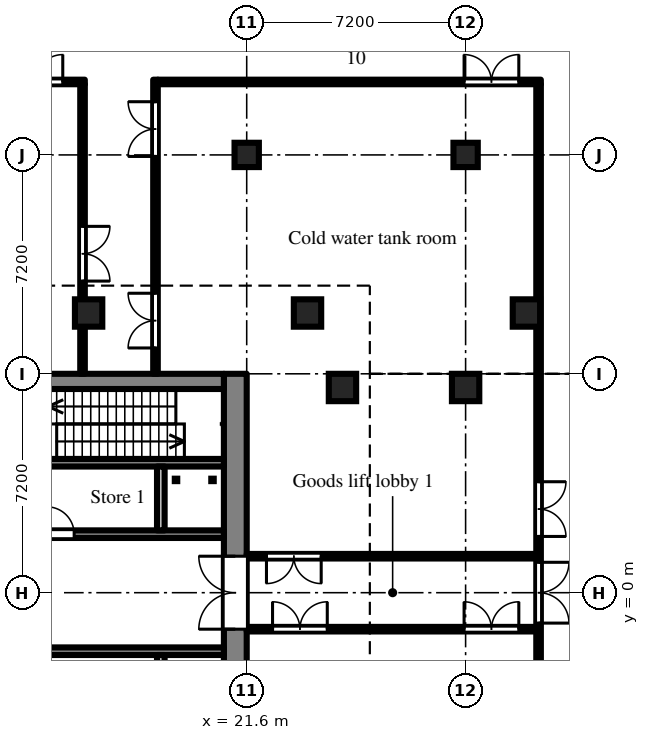
"""IFC4 building model, lengths in metres.
Left out: names, types, materials, properties, quantities, classifications, styles, units other than length and angle.
Written with IfcOpenShell. Run it as: python <this file> out.ifc"""

import sys

from ifc_helpers import new_model, si_unit, direction, frame, frame_2d, origin, origin_2d, place, context, subcontext, project, spatial, rectangle, extrude, element, fill, save


model = new_model("IFC4")
c1 = context("Model", 3, precision=1e-05, world=origin(), true_north=direction((0.0, 1.0)))
c2 = subcontext(c1, "Body", "Model", "MODEL_VIEW")
j1 = project(units=[si_unit("LENGTHUNIT", "METRE"), si_unit("PLANEANGLEUNIT", "RADIAN")], contexts=[c1])
p1 = place(None, origin())
s1 = spatial("IfcSite", under=j1, at=p1, CompositionType="ELEMENT")
p2 = place(p1, origin())
s2 = spatial("IfcBuilding", under=s1, at=p2, CompositionType="ELEMENT")
p3 = place(p2, frame((0.0, 0.0, -4.8)))
s3 = spatial("IfcBuildingStorey", under=s2, at=p3, CompositionType="ELEMENT", Elevation=-4.8)
for number, where, z_axis, x_axis in (
    (1, (24.75, 6.75, -0.5), (0.0, 0.0, 1.0), (1.0, 0.0, 0.0)),
    (2, (28.8, 6.75, -0.5), (0.0, 0.0, 1.0), (1.0, 0.0, 0.0)),
):
    element("IfcColumn", number, at=place(p3, frame(where, z_axis=z_axis, x_axis=x_axis)), inside=s3, PredefinedType="COLUMN", context=c2, shape_type="SweptSolid", body=[
        extrude(rectangle(XDim=0.9, YDim=0.9, at=origin_2d()), origin(), (0.0, 0.0, 1.0), 5.3),
    ])
for number, where, z_axis, x_axis in (
    (3, (21.6, 14.4, -0.5), (0.0, 0.0, 1.0), (1.0, 0.0, 0.0)),
    (4, (28.8, 14.4, -0.5), (0.0, 0.0, 1.0), (1.0, 0.0, 0.0)),
):
    element("IfcColumn", number, at=place(p3, frame(where, z_axis=z_axis, x_axis=x_axis)), inside=s3, PredefinedType="COLUMN", context=c2, shape_type="SweptSolid", body=[
        extrude(rectangle(XDim=0.8, YDim=0.8, at=origin_2d()), origin(), (0.0, 0.0, 1.0), 5.3),
    ])
for number, where, z_axis, x_axis in (
    (5, (16.4, 9.2, -0.5), (0.0, 0.0, 1.0), (1.0, 0.0, 0.0)),
    (6, (23.6, 9.2, -0.5), (0.0, 0.0, 1.0), (1.0, 0.0, 0.0)),
    (7, (30.8, 9.2, -0.5), (0.0, 0.0, 1.0), (1.0, 0.0, 0.0)),
):
    element("IfcColumn", number, at=place(p3, frame(where, z_axis=z_axis, x_axis=x_axis)), inside=s3, PredefinedType="COLUMN", context=c2, shape_type="SweptSolid", body=[
        extrude(rectangle(XDim=0.9, YDim=0.9, at=origin_2d()), origin(), (0.0, 0.0, 1.0), 5.3),
    ])
p4 = place(p3, frame((21.225, -7.2, 0.0), z_axis=(0.0, 0.0, 1.0), x_axis=(0.0, 1.0, 0.0)))
e8 = element("IfcWall", 8, at=p4, inside=s3, PredefinedType="SHEAR", context=c2, shape_type="SweptSolid", body=[
    extrude(rectangle(XDim=14.4, YDim=0.75, at=frame_2d((7.2, 0.0))), origin(), (0.0, 0.0, 1.0), 4.35),
])
p5 = place(p4, frame((6.0, 0.0, 0.0)))
e9 = element("IfcOpeningElement", 9, at=p5, cuts=e8, PredefinedType="OPENING", context=c2, shape_type="SweptSolid", body=[
    extrude(rectangle(XDim=2.4, YDim=2.2, at=frame_2d((1.2, 1.1))), frame((0.0, 0.385, 0.0), z_axis=(0.0, -1.0, 0.0), x_axis=(1.0, 0.0, 0.0)), (0.0, 0.0, 1.0), 0.77),
])
p6 = place(p3, frame((7.9, 6.95, 0.0), z_axis=(0.0, 0.0, 1.0), x_axis=(1.0, 0.0, 0.0)))
e10 = element("IfcWall", 10, at=p6, inside=s3, PredefinedType="SHEAR", context=c2, shape_type="SweptSolid", body=[
    extrude(rectangle(XDim=12.95, YDim=0.5, at=frame_2d((6.475, 0.0))), origin(), (0.0, 0.0, 1.0), 4.35),
])
p7 = place(p3, frame((7.9, 1.925, 0.0), z_axis=(0.0, 0.0, 1.0), x_axis=(1.0, 0.0, 0.0)))
e11 = element("IfcWall", 11, at=p7, inside=s3, PredefinedType="SHEAR", context=c2, shape_type="SweptSolid", body=[
    extrude(rectangle(XDim=12.95, YDim=0.25, at=frame_2d((6.475, 0.0))), origin(), (0.0, 0.0, 1.0), 4.35),
])
p8 = place(p7, frame((0.525, 0.0, 0.0)))
e12 = element("IfcOpeningElement", 12, at=p8, cuts=e11, PredefinedType="OPENING", context=c2, shape_type="SweptSolid", body=[
    extrude(rectangle(XDim=0.9, YDim=2.1, at=frame_2d((0.45, 1.05))), frame((0.0, 0.135, 0.0), z_axis=(0.0, -1.0, 0.0), x_axis=(1.0, 0.0, 0.0)), (0.0, 0.0, 1.0), 0.27),
])
p9 = place(p7, frame((2.625, 0.0, 0.0)))
e13 = element("IfcOpeningElement", 13, at=p9, cuts=e11, PredefinedType="OPENING", context=c2, shape_type="SweptSolid", body=[
    extrude(rectangle(XDim=1.1, YDim=2.1, at=frame_2d((0.55, 1.05))), frame((0.0, 0.135, 0.0), z_axis=(0.0, -1.0, 0.0), x_axis=(1.0, 0.0, 0.0)), (0.0, 0.0, 1.0), 0.27),
])
p10 = place(p7, frame((7.125, 0.0, 0.0)))
e14 = element("IfcOpeningElement", 14, at=p10, cuts=e11, PredefinedType="OPENING", context=c2, shape_type="SweptSolid", body=[
    extrude(rectangle(XDim=0.9, YDim=2.1, at=frame_2d((0.45, 1.05))), frame((0.0, 0.135, 0.0), z_axis=(0.0, -1.0, 0.0), x_axis=(1.0, 0.0, 0.0)), (0.0, 0.0, 1.0), 0.27),
])
p11 = place(p3, frame((12.3, 4.275, 0.0), z_axis=(0.0, 0.0, 1.0), x_axis=(1.0, 0.0, 0.0)))
e15 = element("IfcWall", 15, at=p11, inside=s3, PredefinedType="SHEAR", context=c2, shape_type="SweptSolid", body=[
    extrude(rectangle(XDim=8.55, YDim=0.25, at=frame_2d((4.275, 0.0))), origin(), (0.0, 0.0, 1.0), 4.35),
])
p12 = place(p3, frame((18.775, 2.05, 0.0), z_axis=(0.0, 0.0, 1.0), x_axis=(0.0, 1.0, 0.0)))
e16 = element("IfcWall", 16, at=p12, inside=s3, PredefinedType="PARTITIONING", context=c2, shape_type="SweptSolid", body=[
    extrude(rectangle(XDim=2.1, YDim=0.25, at=frame_2d((1.05, 0.0))), origin(), (0.0, 0.0, 1.0), 4.35),
])
p13 = place(p3, frame((7.9, -1.925, 0.0), z_axis=(0.0, 0.0, 1.0), x_axis=(1.0, 0.0, 0.0)))
e17 = element("IfcWall", 17, at=p13, inside=s3, PredefinedType="SHEAR", context=c2, shape_type="SweptSolid", body=[
    extrude(rectangle(XDim=12.95, YDim=0.25, at=frame_2d((6.475, 0.0))), origin(), (0.0, 0.0, 1.0), 4.35),
])
p14 = place(p13, frame((0.525, 0.0, 0.0)))
e18 = element("IfcOpeningElement", 18, at=p14, cuts=e17, PredefinedType="OPENING", context=c2, shape_type="SweptSolid", body=[
    extrude(rectangle(XDim=0.9, YDim=2.1, at=frame_2d((0.45, 1.05))), frame((0.0, 0.135, 0.0), z_axis=(0.0, -1.0, 0.0), x_axis=(1.0, 0.0, 0.0)), (0.0, 0.0, 1.0), 0.27),
])
p15 = place(p13, frame((2.625, 0.0, 0.0)))
e19 = element("IfcOpeningElement", 19, at=p15, cuts=e17, PredefinedType="OPENING", context=c2, shape_type="SweptSolid", body=[
    extrude(rectangle(XDim=1.1, YDim=2.1, at=frame_2d((0.55, 1.05))), frame((0.0, 0.135, 0.0), z_axis=(0.0, -1.0, 0.0), x_axis=(1.0, 0.0, 0.0)), (0.0, 0.0, 1.0), 0.27),
])
p16 = place(p3, frame((18.775, -2.05, 0.0), z_axis=(0.0, 0.0, 1.0), x_axis=(0.0, -1.0, 0.0)))
e20 = element("IfcWall", 20, at=p16, inside=s3, PredefinedType="PARTITIONING", context=c2, shape_type="SweptSolid", body=[
    extrude(rectangle(XDim=2.1, YDim=0.25, at=frame_2d((1.05, 0.0))), origin(), (0.0, 0.0, 1.0), 4.35),
])
p17 = place(p3, frame((1.275, 16.8, 0.0), z_axis=(0.0, 0.0, 1.0), x_axis=(1.0, 0.0, 0.0)))
e21 = element("IfcWall", 21, at=p17, inside=s3, PredefinedType="PARTITIONING", context=c2, shape_type="SweptSolid", body=[
    extrude(rectangle(XDim=15.0, YDim=0.15, at=frame_2d((7.5, 0.0))), origin(), (0.0, 0.0, 1.0), 4.35),
])
p18 = place(p17, frame((12.475, 0.0, 0.0)))
e22 = element("IfcOpeningElement", 22, at=p18, cuts=e21, PredefinedType="OPENING", context=c2, shape_type="SweptSolid", body=[
    extrude(rectangle(XDim=1.8, YDim=2.1, at=frame_2d((0.9, 1.05))), frame((0.0, 0.085, 0.0), z_axis=(0.0, -1.0, 0.0), x_axis=(1.0, 0.0, 0.0)), (0.0, 0.0, 1.0), 0.17),
])
p19 = place(p3, frame((16.2, 7.2, 0.0), z_axis=(0.0, 0.0, 1.0), x_axis=(0.0, 1.0, 0.0)))
e23 = element("IfcWall", 23, at=p19, inside=s3, PredefinedType="PARTITIONING", context=c2, shape_type="SweptSolid", body=[
    extrude(rectangle(XDim=9.525, YDim=0.15, at=frame_2d((4.763, 0.0))), origin(), (0.0, 0.0, 1.0), 4.35),
])
p20 = place(p19, frame((3.05, 0.0, 0.0)))
e24 = element("IfcOpeningElement", 24, at=p20, cuts=e23, PredefinedType="OPENING", context=c2, shape_type="SweptSolid", body=[
    extrude(rectangle(XDim=1.8, YDim=2.1, at=frame_2d((0.9, 1.05))), frame((0.0, 0.085, 0.0), z_axis=(0.0, -1.0, 0.0), x_axis=(1.0, 0.0, 0.0)), (0.0, 0.0, 1.0), 0.17),
])
p21 = place(p3, frame((18.6, 7.2, 0.0), z_axis=(0.0, 0.0, 1.0), x_axis=(0.0, 1.0, 0.0)))
e25 = element("IfcWall", 25, at=p21, inside=s3, PredefinedType="PARTITIONING", context=c2, shape_type="SweptSolid", body=[
    extrude(rectangle(XDim=9.675, YDim=0.15, at=frame_2d((4.837, 0.0))), origin(), (0.0, 0.0, 1.0), 4.35),
])
p22 = place(p21, frame((0.85, 0.0, 0.0)))
e26 = element("IfcOpeningElement", 26, at=p22, cuts=e25, PredefinedType="OPENING", context=c2, shape_type="SweptSolid", body=[
    extrude(rectangle(XDim=1.8, YDim=2.1, at=frame_2d((0.9, 1.05))), frame((0.0, 0.085, 0.0), z_axis=(0.0, -1.0, 0.0), x_axis=(1.0, 0.0, 0.0)), (0.0, 0.0, 1.0), 0.17),
])
p23 = place(p21, frame((7.15, 0.0, 0.0)))
e27 = element("IfcOpeningElement", 27, at=p23, cuts=e25, PredefinedType="OPENING", context=c2, shape_type="SweptSolid", body=[
    extrude(rectangle(XDim=1.8, YDim=2.1, at=frame_2d((0.9, 1.05))), frame((0.0, 0.085, 0.0), z_axis=(0.0, -1.0, 0.0), x_axis=(1.0, 0.0, 0.0)), (0.0, 0.0, 1.0), 0.17),
])
p24 = place(p3, frame((18.675, 16.8, 0.0), z_axis=(0.0, 0.0, 1.0), x_axis=(1.0, 0.0, 0.0)))
e28 = element("IfcWall", 28, at=p24, inside=s3, PredefinedType="PARTITIONING", context=c2, shape_type="SweptSolid", body=[
    extrude(rectangle(XDim=12.6, YDim=0.15, at=frame_2d((6.3, 0.0))), origin(), (0.0, 0.0, 1.0), 4.35),
])
p25 = place(p24, frame((10.075, 0.0, 0.0)))
e29 = element("IfcOpeningElement", 29, at=p25, cuts=e28, PredefinedType="OPENING", context=c2, shape_type="SweptSolid", body=[
    extrude(rectangle(XDim=1.8, YDim=2.1, at=frame_2d((0.9, 1.05))), frame((0.0, 0.085, 0.0), z_axis=(0.0, -1.0, 0.0), x_axis=(1.0, 0.0, 0.0)), (0.0, 0.0, 1.0), 0.17),
])
p26 = place(p3, frame((21.6, -1.2, 0.0), z_axis=(0.0, 0.0, 1.0), x_axis=(1.0, 0.0, 0.0)))
e30 = element("IfcWall", 30, at=p26, inside=s3, PredefinedType="PARTITIONING", context=c2, shape_type="SweptSolid", body=[
    extrude(rectangle(XDim=9.525, YDim=0.15, at=frame_2d((4.762, 0.0))), origin(), (0.0, 0.0, 1.0), 4.35),
])
p27 = place(p26, frame((0.85, 0.0, 0.0)))
e31 = element("IfcOpeningElement", 31, at=p27, cuts=e30, PredefinedType="OPENING", context=c2, shape_type="SweptSolid", body=[
    extrude(rectangle(XDim=1.8, YDim=2.1, at=frame_2d((0.9, 1.05))), frame((0.0, 0.085, 0.0), z_axis=(0.0, -1.0, 0.0), x_axis=(1.0, 0.0, 0.0)), (0.0, 0.0, 1.0), 0.17),
])
p28 = place(p26, frame((7.15, 0.0, 0.0)))
e32 = element("IfcOpeningElement", 32, at=p28, cuts=e30, PredefinedType="OPENING", context=c2, shape_type="SweptSolid", body=[
    extrude(rectangle(XDim=1.8, YDim=2.1, at=frame_2d((0.9, 1.05))), frame((0.0, 0.085, 0.0), z_axis=(0.0, -1.0, 0.0), x_axis=(1.0, 0.0, 0.0)), (0.0, 0.0, 1.0), 0.17),
])
p29 = place(p3, frame((21.6, 1.2, 0.0), z_axis=(0.0, 0.0, 1.0), x_axis=(1.0, 0.0, 0.0)))
e33 = element("IfcWall", 33, at=p29, inside=s3, PredefinedType="PARTITIONING", context=c2, shape_type="SweptSolid", body=[
    extrude(rectangle(XDim=9.525, YDim=0.15, at=frame_2d((4.762, 0.0))), origin(), (0.0, 0.0, 1.0), 4.35),
])
p30 = place(p29, frame((0.65, 0.0, 0.0)))
e34 = element("IfcOpeningElement", 34, at=p30, cuts=e33, PredefinedType="OPENING", context=c2, shape_type="SweptSolid", body=[
    extrude(rectangle(XDim=1.8, YDim=2.1, at=frame_2d((0.9, 1.05))), frame((0.0, 0.085, 0.0), z_axis=(0.0, -1.0, 0.0), x_axis=(1.0, 0.0, 0.0)), (0.0, 0.0, 1.0), 0.17),
])
p31 = place(p3, frame((31.2, -16.725, 0.0), z_axis=(0.0, 0.0, 1.0), x_axis=(0.0, 1.0, 0.0)))
e35 = element("IfcWall", 35, at=p31, inside=s3, PredefinedType="PARTITIONING", context=c2, shape_type="SweptSolid", body=[
    extrude(rectangle(XDim=33.45, YDim=0.15, at=frame_2d((16.725, 0.0))), origin(), (0.0, 0.0, 1.0), 4.35),
])
p32 = place(p31, frame((15.725, 0.0, 0.0)))
e36 = element("IfcOpeningElement", 36, at=p32, cuts=e35, PredefinedType="OPENING", context=c2, shape_type="SweptSolid", body=[
    extrude(rectangle(XDim=2.0, YDim=2.1, at=frame_2d((1.0, 1.05))), frame((0.0, 0.085, 0.0), z_axis=(0.0, -1.0, 0.0), x_axis=(1.0, 0.0, 0.0)), (0.0, 0.0, 1.0), 0.17),
])
p33 = place(p31, frame((18.575, 0.0, 0.0)))
e37 = element("IfcOpeningElement", 37, at=p33, cuts=e35, PredefinedType="OPENING", context=c2, shape_type="SweptSolid", body=[
    extrude(rectangle(XDim=1.8, YDim=2.1, at=frame_2d((0.9, 1.05))), frame((0.0, 0.085, 0.0), z_axis=(0.0, -1.0, 0.0), x_axis=(1.0, 0.0, 0.0)), (0.0, 0.0, 1.0), 0.17),
])
p34 = place(p31, frame((0.575, 0.0, 0.0)))
e38 = element("IfcOpeningElement", 38, at=p34, cuts=e35, PredefinedType="OPENING", context=c2, shape_type="SweptSolid", body=[
    extrude(rectangle(XDim=1.8, YDim=2.1, at=frame_2d((0.9, 1.05))), frame((0.0, 0.085, 0.0), z_axis=(0.0, -1.0, 0.0), x_axis=(1.0, 0.0, 0.0)), (0.0, 0.0, 1.0), 0.17),
])
p35 = place(p5, origin())
e39 = element("IfcDoor", 39, at=p35, inside=s3, OperationType="DOUBLE_DOOR_DOUBLE_SWING", PredefinedType="DOOR", context=c2, shape_type="SweptSolid", body=[
    extrude(rectangle(XDim=2.4, YDim=2.2, at=frame_2d((1.2, 1.1))), frame((0.0, 0.025, 0.0), z_axis=(0.0, -1.0, 0.0), x_axis=(1.0, 0.0, 0.0)), (0.0, 0.0, 1.0), 0.05),
])
fill(e9, e39)
p36 = place(p10, origin())
e40 = element("IfcDoor", 40, at=p36, inside=s3, OperationType="SINGLE_SWING_LEFT", PredefinedType="DOOR", context=c2, shape_type="SweptSolid", body=[
    extrude(rectangle(XDim=0.9, YDim=2.1, at=frame_2d((0.45, 1.05))), frame((0.0, 0.025, 0.0), z_axis=(0.0, -1.0, 0.0), x_axis=(1.0, 0.0, 0.0)), (0.0, 0.0, 1.0), 0.05),
])
fill(e14, e40)
p37 = place(p32, frame((2.0, 0.0, 0.0), z_axis=(0.0, 0.0, 1.0), x_axis=(-1.0, 0.0, 0.0)))
e41 = element("IfcDoor", 41, at=p37, inside=s3, OperationType="DOUBLE_DOOR_DOUBLE_SWING", PredefinedType="DOOR", context=c2, shape_type="SweptSolid", body=[
    extrude(rectangle(XDim=2.0, YDim=2.1, at=frame_2d((1.0, 1.05))), frame((0.0, 0.025, 0.0), z_axis=(0.0, -1.0, 0.0), x_axis=(1.0, 0.0, 0.0)), (0.0, 0.0, 1.0), 0.05),
])
fill(e36, e41)
p38 = place(p18, origin())
e42 = element("IfcDoor", 42, at=p38, inside=s3, OperationType="DOUBLE_DOOR_DOUBLE_SWING", PredefinedType="DOOR", context=c2, shape_type="SweptSolid", body=[
    extrude(rectangle(XDim=1.8, YDim=2.1, at=frame_2d((0.9, 1.05))), frame((0.0, 0.025, 0.0), z_axis=(0.0, -1.0, 0.0), x_axis=(1.0, 0.0, 0.0)), (0.0, 0.0, 1.0), 0.05),
])
fill(e22, e42)
p39 = place(p20, frame((1.8, 0.0, 0.0), z_axis=(0.0, 0.0, 1.0), x_axis=(-1.0, 0.0, 0.0)))
e43 = element("IfcDoor", 43, at=p39, inside=s3, OperationType="DOUBLE_DOOR_DOUBLE_SWING", PredefinedType="DOOR", context=c2, shape_type="SweptSolid", body=[
    extrude(rectangle(XDim=1.8, YDim=2.1, at=frame_2d((0.9, 1.05))), frame((0.0, 0.025, 0.0), z_axis=(0.0, -1.0, 0.0), x_axis=(1.0, 0.0, 0.0)), (0.0, 0.0, 1.0), 0.05),
])
fill(e24, e43)
p40 = place(p22, origin())
e44 = element("IfcDoor", 44, at=p40, inside=s3, OperationType="DOUBLE_DOOR_DOUBLE_SWING", PredefinedType="DOOR", context=c2, shape_type="SweptSolid", body=[
    extrude(rectangle(XDim=1.8, YDim=2.1, at=frame_2d((0.9, 1.05))), frame((0.0, 0.025, 0.0), z_axis=(0.0, -1.0, 0.0), x_axis=(1.0, 0.0, 0.0)), (0.0, 0.0, 1.0), 0.05),
])
fill(e26, e44)
p41 = place(p23, origin())
e45 = element("IfcDoor", 45, at=p41, inside=s3, OperationType="DOUBLE_DOOR_DOUBLE_SWING", PredefinedType="DOOR", context=c2, shape_type="SweptSolid", body=[
    extrude(rectangle(XDim=1.8, YDim=2.1, at=frame_2d((0.9, 1.05))), frame((0.0, 0.025, 0.0), z_axis=(0.0, -1.0, 0.0), x_axis=(1.0, 0.0, 0.0)), (0.0, 0.0, 1.0), 0.05),
])
fill(e27, e45)
p42 = place(p30, frame((1.8, 0.0, 0.0), z_axis=(0.0, 0.0, 1.0), x_axis=(-1.0, 0.0, 0.0)))
e46 = element("IfcDoor", 46, at=p42, inside=s3, OperationType="DOUBLE_DOOR_DOUBLE_SWING", PredefinedType="DOOR", context=c2, shape_type="SweptSolid", body=[
    extrude(rectangle(XDim=1.8, YDim=2.1, at=frame_2d((0.9, 1.05))), frame((0.0, 0.025, 0.0), z_axis=(0.0, -1.0, 0.0), x_axis=(1.0, 0.0, 0.0)), (0.0, 0.0, 1.0), 0.05),
])
fill(e34, e46)
p43 = place(p25, origin())
e47 = element("IfcDoor", 47, at=p43, inside=s3, OperationType="DOUBLE_DOOR_DOUBLE_SWING", PredefinedType="DOOR", context=c2, shape_type="SweptSolid", body=[
    extrude(rectangle(XDim=1.8, YDim=2.1, at=frame_2d((0.9, 1.05))), frame((0.0, 0.025, 0.0), z_axis=(0.0, -1.0, 0.0), x_axis=(1.0, 0.0, 0.0)), (0.0, 0.0, 1.0), 0.05),
])
fill(e29, e47)
p44 = place(p33, frame((1.8, 0.0, 0.0), z_axis=(0.0, 0.0, 1.0), x_axis=(-1.0, 0.0, 0.0)))
e48 = element("IfcDoor", 48, at=p44, inside=s3, OperationType="DOUBLE_DOOR_DOUBLE_SWING", PredefinedType="DOOR", context=c2, shape_type="SweptSolid", body=[
    extrude(rectangle(XDim=1.8, YDim=2.1, at=frame_2d((0.9, 1.05))), frame((0.0, 0.025, 0.0), z_axis=(0.0, -1.0, 0.0), x_axis=(1.0, 0.0, 0.0)), (0.0, 0.0, 1.0), 0.05),
])
fill(e37, e48)
p45 = place(p27, origin())
e49 = element("IfcDoor", 49, at=p45, inside=s3, OperationType="DOUBLE_DOOR_DOUBLE_SWING", PredefinedType="DOOR", context=c2, shape_type="SweptSolid", body=[
    extrude(rectangle(XDim=1.8, YDim=2.1, at=frame_2d((0.9, 1.05))), frame((0.0, 0.025, 0.0), z_axis=(0.0, -1.0, 0.0), x_axis=(1.0, 0.0, 0.0)), (0.0, 0.0, 1.0), 0.05),
])
fill(e31, e49)
p46 = place(p28, origin())
e50 = element("IfcDoor", 50, at=p46, inside=s3, OperationType="DOUBLE_DOOR_DOUBLE_SWING", PredefinedType="DOOR", context=c2, shape_type="SweptSolid", body=[
    extrude(rectangle(XDim=1.8, YDim=2.1, at=frame_2d((0.9, 1.05))), frame((0.0, 0.025, 0.0), z_axis=(0.0, -1.0, 0.0), x_axis=(1.0, 0.0, 0.0)), (0.0, 0.0, 1.0), 0.05),
])
fill(e32, e50)
save(model, sys.argv[1])
